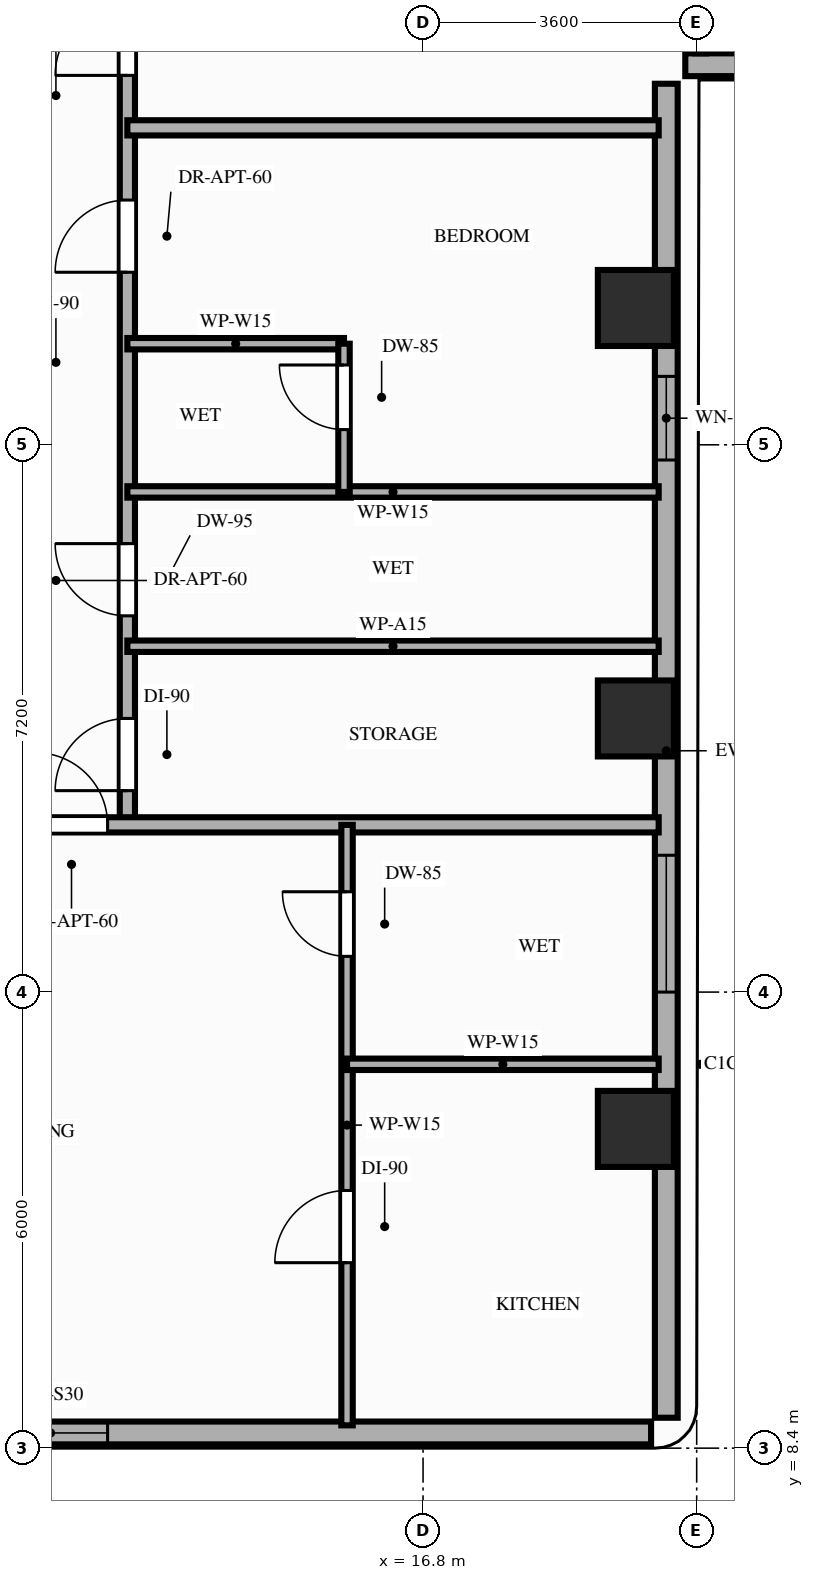
"""IFC4 building model, lengths in metres.
Left out: names, types, materials, properties, quantities, classifications, styles, units other than length and angle.
Written with IfcOpenShell. Run it as: python <this file> out.ifc"""

import sys

from ifc_helpers import new_model, si_unit, direction, frame, frame_2d, origin, origin_2d, place, context, subcontext, project, spatial, rectangle, extrude, element, fill, save


model = new_model("IFC4")
c1 = context("Model", 3, precision=1e-05, world=origin(), true_north=direction((0.0, 1.0)))
c2 = subcontext(c1, "Body", "Model", "MODEL_VIEW")
j1 = project(units=[si_unit("LENGTHUNIT", "METRE"), si_unit("PLANEANGLEUNIT", "RADIAN")], contexts=[c1])
p1 = place(None, origin())
s1 = spatial("IfcSite", under=j1, at=p1, CompositionType="ELEMENT")
p2 = place(p1, origin())
s2 = spatial("IfcBuilding", under=s1, at=p2, CompositionType="ELEMENT")
p3 = place(p2, frame((0.0, 0.0, 120.2)))
s3 = spatial("IfcBuildingStorey", under=s2, at=p3, CompositionType="ELEMENT", Elevation=120.2)
for number, where, z_axis, x_axis in (
    (1, (19.6, 12.6, 0.0), (0.0, 0.0, 1.0), (1.0, 0.0, 0.0)),
    (2, (19.6, 18.0, 0.0), (0.0, 0.0, 1.0), (1.0, 0.0, 0.0)),
    (3, (19.6, 23.4, 0.0), (0.0, 0.0, 1.0), (1.0, 0.0, 0.0)),
):
    element("IfcColumn", number, at=place(p3, frame(where, z_axis=z_axis, x_axis=x_axis)), inside=s3, PredefinedType="COLUMN", context=c2, shape_type="SweptSolid", body=[
        extrude(rectangle(XDim=1.0, YDim=1.0, at=origin_2d()), origin(), (0.0, 0.0, 1.0), 3.2),
    ])
p4 = place(p3, frame((4.0, 8.6, 0.0), z_axis=(0.0, 0.0, 1.0), x_axis=(1.0, 0.0, 0.0)))
e4 = element("IfcWall", 4, at=p4, inside=s3, PredefinedType="STANDARD", context=c2, shape_type="SweptSolid", body=[
    extrude(rectangle(XDim=15.8, YDim=0.3, at=frame_2d((7.9, 0.0))), origin(), (0.0, 0.0, 1.0), 3.02),
])
p5 = place(p4, frame((6.85, 0.0, 0.85)))
e5 = element("IfcOpeningElement", 5, at=p5, cuts=e4, PredefinedType="OPENING", context=c2, shape_type="SweptSolid", body=[
    extrude(rectangle(XDim=1.8, YDim=1.75, at=frame_2d((0.9, 0.875))), frame((0.0, 0.16, 0.0), z_axis=(0.0, -1.0, 0.0), x_axis=(1.0, 0.0, 0.0)), (0.0, 0.0, 1.0), 0.32),
])
p6 = place(p3, frame((20.0, 8.8, 0.0), z_axis=(0.0, 0.0, 1.0), x_axis=(0.0, 1.0, 0.0)))
e6 = element("IfcWall", 6, at=p6, inside=s3, PredefinedType="STANDARD", context=c2, shape_type="SweptSolid", body=[
    extrude(rectangle(XDim=17.55, YDim=0.3, at=frame_2d((8.775, 0.0))), origin(), (0.0, 0.0, 1.0), 2.41),
])
p7 = place(p6, frame((12.6, 0.0, 0.85)))
e7 = element("IfcOpeningElement", 7, at=p7, cuts=e6, PredefinedType="OPENING", context=c2, shape_type="SweptSolid", body=[
    extrude(rectangle(XDim=1.1, YDim=1.31, at=frame_2d((0.55, 0.655))), frame((0.0, 0.16, 0.0), z_axis=(0.0, -1.0, 0.0), x_axis=(1.0, 0.0, 0.0)), (0.0, 0.0, 1.0), 0.32),
])
p8 = place(p6, frame((5.6, 0.0, 0.85)))
e8 = element("IfcOpeningElement", 8, at=p8, cuts=e6, PredefinedType="OPENING", context=c2, shape_type="SweptSolid", body=[
    extrude(rectangle(XDim=1.8, YDim=1.31, at=frame_2d((0.9, 0.655))), frame((0.0, 0.16, 0.0), z_axis=(0.0, -1.0, 0.0), x_axis=(1.0, 0.0, 0.0)), (0.0, 0.0, 1.0), 0.32),
])
p9 = place(p3, frame((20.25, 26.6, 0.0), z_axis=(0.0, 0.0, 1.0), x_axis=(1.0, 0.0, 0.0)))
e9 = element("IfcWall", 9, at=p9, inside=s3, PredefinedType="STANDARD", context=c2, shape_type="SweptSolid", body=[
    extrude(rectangle(XDim=26.15, YDim=0.3, at=frame_2d((13.075, 0.0))), origin(), (0.0, 0.0, 1.0), 2.71),
])
p10 = place(p9, frame((13.85, 0.0, 0.0)))
e10 = element("IfcOpeningElement", 10, at=p10, cuts=e9, PredefinedType="OPENING", context=c2, shape_type="SweptSolid", body=[
    extrude(rectangle(XDim=1.4, YDim=2.1, at=frame_2d((0.7, 1.05))), frame((0.0, 0.16, 0.0), z_axis=(0.0, -1.0, 0.0), x_axis=(1.0, 0.0, 0.0)), (0.0, 0.0, 1.0), 0.32),
])
p11 = place(p9, frame((2.25, 0.0, 0.85)))
e11 = element("IfcOpeningElement", 11, at=p11, cuts=e9, PredefinedType="OPENING", context=c2, shape_type="SweptSolid", body=[
    extrude(rectangle(XDim=1.8, YDim=1.61, at=frame_2d((0.9, 0.805))), frame((0.0, 0.16, 0.0), z_axis=(0.0, -1.0, 0.0), x_axis=(1.0, 0.0, 0.0)), (0.0, 0.0, 1.0), 0.32),
])
p12 = place(p9, frame((22.25, 0.0, 0.85)))
e12 = element("IfcOpeningElement", 12, at=p12, cuts=e9, PredefinedType="OPENING", context=c2, shape_type="SweptSolid", body=[
    extrude(rectangle(XDim=1.8, YDim=1.61, at=frame_2d((0.9, 0.805))), frame((0.0, 0.16, 0.0), z_axis=(0.0, -1.0, 0.0), x_axis=(1.0, 0.0, 0.0)), (0.0, 0.0, 1.0), 0.32),
])
p13 = place(p3, frame((12.91, 16.6, 0.0), z_axis=(0.0, 0.0, 1.0), x_axis=(0.0, 1.0, 0.0)))
e13 = element("IfcWall", 13, at=p13, inside=s3, PredefinedType="PARTITIONING", context=c2, shape_type="SweptSolid", body=[
    extrude(rectangle(XDim=11.5, YDim=0.2, at=frame_2d((5.75, 0.0))), origin(), (0.0, 0.0, 1.0), 2.41),
])
p14 = place(p13, frame((0.45, 0.0, 0.0)))
e14 = element("IfcOpeningElement", 14, at=p14, cuts=e13, PredefinedType="OPENING", context=c2, shape_type="SweptSolid", body=[
    extrude(rectangle(XDim=0.95, YDim=2.15, at=frame_2d((0.475, 1.075))), frame((0.0, 0.11, 0.0), z_axis=(0.0, -1.0, 0.0), x_axis=(1.0, 0.0, 0.0)), (0.0, 0.0, 1.0), 0.22),
])
p15 = place(p13, frame((2.75, 0.0, 0.0)))
e15 = element("IfcOpeningElement", 15, at=p15, cuts=e13, PredefinedType="OPENING", context=c2, shape_type="SweptSolid", body=[
    extrude(rectangle(XDim=0.95, YDim=2.1, at=frame_2d((0.475, 1.05))), frame((0.0, 0.11, 0.0), z_axis=(0.0, -1.0, 0.0), x_axis=(1.0, 0.0, 0.0)), (0.0, 0.0, 1.0), 0.22),
])
p16 = place(p13, frame((9.86, 0.0, 0.0)))
e16 = element("IfcOpeningElement", 16, at=p16, cuts=e13, PredefinedType="OPENING", context=c2, shape_type="SweptSolid", body=[
    extrude(rectangle(XDim=0.95, YDim=2.15, at=frame_2d((0.475, 1.075))), frame((0.0, 0.11, 0.0), z_axis=(0.0, -1.0, 0.0), x_axis=(1.0, 0.0, 0.0)), (0.0, 0.0, 1.0), 0.22),
])
p17 = place(p13, frame((7.27, 0.0, 0.0)))
e17 = element("IfcOpeningElement", 17, at=p17, cuts=e13, PredefinedType="OPENING", context=c2, shape_type="SweptSolid", body=[
    extrude(rectangle(XDim=0.95, YDim=2.15, at=frame_2d((0.475, 1.075))), frame((0.0, 0.11, 0.0), z_axis=(0.0, -1.0, 0.0), x_axis=(1.0, 0.0, 0.0)), (0.0, 0.0, 1.0), 0.22),
])
p18 = place(p3, frame((3.9, 16.6, 0.0), z_axis=(0.0, 0.0, 1.0), x_axis=(1.0, 0.0, 0.0)))
e18 = element("IfcWall", 18, at=p18, inside=s3, PredefinedType="PARTITIONING", context=c2, shape_type="SweptSolid", body=[
    extrude(rectangle(XDim=16.0, YDim=0.2, at=frame_2d((8.0, 0.0))), origin(), (0.0, 0.0, 1.0), 2.41),
])
p19 = place(p18, frame((7.8, 0.0, 0.0)))
e19 = element("IfcOpeningElement", 19, at=p19, cuts=e18, PredefinedType="OPENING", context=c2, shape_type="SweptSolid", body=[
    extrude(rectangle(XDim=0.95, YDim=2.15, at=frame_2d((0.475, 1.075))), frame((0.0, 0.11, 0.0), z_axis=(0.0, -1.0, 0.0), x_axis=(1.0, 0.0, 0.0)), (0.0, 0.0, 1.0), 0.22),
])
p20 = place(p3, frame((20.45, 26.75, 0.0), z_axis=(0.0, 0.0, 1.0), x_axis=(0.0, 1.0, 0.0)))
e20 = element("IfcWall", 20, at=p20, inside=s3, PredefinedType="PARTITIONING", context=c2, shape_type="SweptSolid", body=[
    extrude(rectangle(XDim=2.95, YDim=0.15, at=frame_2d((1.475, 0.0))), origin(), (0.0, 0.0, 1.0), 2.41),
])
p21 = place(p3, frame((15.8, 8.7, 0.0), z_axis=(0.0, 0.0, 1.0), x_axis=(0.0, 1.0, 0.0)))
e21 = element("IfcWall", 21, at=p21, inside=s3, PredefinedType="PARTITIONING", context=c2, shape_type="SweptSolid", body=[
    extrude(rectangle(XDim=7.9, YDim=0.15, at=frame_2d((3.95, 0.0))), origin(), (0.0, 0.0, 1.0), 2.41),
])
p22 = place(p21, frame((2.14, 0.0, 0.0)))
e22 = element("IfcOpeningElement", 22, at=p22, cuts=e21, PredefinedType="OPENING", context=c2, shape_type="SweptSolid", body=[
    extrude(rectangle(XDim=0.95, YDim=2.15, at=frame_2d((0.475, 1.075))), frame((0.0, 0.085, 0.0), z_axis=(0.0, -1.0, 0.0), x_axis=(1.0, 0.0, 0.0)), (0.0, 0.0, 1.0), 0.17),
])
p23 = place(p21, frame((6.17, 0.0, 0.0)))
e23 = element("IfcOpeningElement", 23, at=p23, cuts=e21, PredefinedType="OPENING", context=c2, shape_type="SweptSolid", body=[
    extrude(rectangle(XDim=0.85, YDim=2.1, at=frame_2d((0.425, 1.05))), frame((0.0, 0.085, 0.0), z_axis=(0.0, -1.0, 0.0), x_axis=(1.0, 0.0, 0.0)), (0.0, 0.0, 1.0), 0.17),
])
p24 = place(p3, frame((15.8, 13.45, 0.0), z_axis=(0.0, 0.0, 1.0), x_axis=(1.0, 0.0, 0.0)))
e24 = element("IfcWall", 24, at=p24, inside=s3, PredefinedType="PARTITIONING", context=c2, shape_type="SweptSolid", body=[
    extrude(rectangle(XDim=4.1, YDim=0.15, at=frame_2d((2.05, 0.0))), origin(), (0.0, 0.0, 1.0), 2.41),
])
for number, where, z_axis, x_axis in (
    (25, (12.91, 18.95, 0.0), (0.0, 0.0, 1.0), (1.0, 0.0, 0.0)),
    (26, (12.91, 20.98, 0.0), (0.0, 0.0, 1.0), (1.0, 0.0, 0.0)),
):
    element("IfcWall", number, at=place(p3, frame(where, z_axis=z_axis, x_axis=x_axis)), inside=s3, PredefinedType="PARTITIONING", context=c2, shape_type="SweptSolid", body=[
        extrude(rectangle(XDim=6.99, YDim=0.15, at=frame_2d((3.495, 0.0))), origin(), (0.0, 0.0, 1.0), 2.41),
    ])
p25 = place(p3, frame((12.91, 25.77, 0.0), z_axis=(0.0, 0.0, 1.0), x_axis=(1.0, 0.0, 0.0)))
e27 = element("IfcWall", 27, at=p25, inside=s3, PredefinedType="PARTITIONING", context=c2, shape_type="SweptSolid", body=[
    extrude(rectangle(XDim=6.99, YDim=0.2, at=frame_2d((3.495, 0.0))), origin(), (0.0, 0.0, 1.0), 2.41),
])
p26 = place(p3, frame((12.91, 22.93, 0.0), z_axis=(0.0, 0.0, 1.0), x_axis=(1.0, 0.0, 0.0)))
e28 = element("IfcWall", 28, at=p26, inside=s3, PredefinedType="PARTITIONING", context=c2, shape_type="SweptSolid", body=[
    extrude(rectangle(XDim=2.85, YDim=0.15, at=frame_2d((1.425, 0.0))), origin(), (0.0, 0.0, 1.0), 3.02),
])
p27 = place(p3, frame((15.76, 20.98, 0.0), z_axis=(0.0, 0.0, 1.0), x_axis=(0.0, 1.0, 0.0)))
e29 = element("IfcWall", 29, at=p27, inside=s3, PredefinedType="PARTITIONING", context=c2, shape_type="SweptSolid", body=[
    extrude(rectangle(XDim=1.95, YDim=0.15, at=frame_2d((0.975, 0.0))), origin(), (0.0, 0.0, 1.0), 2.6),
])
p28 = place(p27, frame((0.82, 0.0, 0.0)))
e30 = element("IfcOpeningElement", 30, at=p28, cuts=e29, PredefinedType="OPENING", context=c2, shape_type="SweptSolid", body=[
    extrude(rectangle(XDim=0.85, YDim=2.1, at=frame_2d((0.425, 1.05))), frame((0.0, 0.085, 0.0), z_axis=(0.0, -1.0, 0.0), x_axis=(1.0, 0.0, 0.0)), (0.0, 0.0, 1.0), 0.17),
])
p29 = place(p5, origin())
e31 = element("IfcWindow", 31, at=p29, inside=s3, PartitioningType="SINGLE_PANEL", PredefinedType="WINDOW", context=c2, shape_type="SweptSolid", body=[
    extrude(rectangle(XDim=1.8, YDim=1.75, at=frame_2d((0.9, 0.875))), frame((0.0, 0.03, 0.0), z_axis=(0.0, -1.0, 0.0), x_axis=(1.0, 0.0, 0.0)), (0.0, 0.0, 1.0), 0.06),
])
fill(e5, e31)
p30 = place(p7, origin())
e32 = element("IfcWindow", 32, at=p30, inside=s3, PartitioningType="SINGLE_PANEL", PredefinedType="WINDOW", context=c2, shape_type="SweptSolid", body=[
    extrude(rectangle(XDim=1.1, YDim=1.31, at=frame_2d((0.55, 0.655))), frame((0.0, 0.03, 0.0), z_axis=(0.0, -1.0, 0.0), x_axis=(1.0, 0.0, 0.0)), (0.0, 0.0, 1.0), 0.06),
])
fill(e7, e32)
p31 = place(p8, origin())
e33 = element("IfcWindow", 33, at=p31, inside=s3, PartitioningType="SINGLE_PANEL", PredefinedType="WINDOW", context=c2, shape_type="SweptSolid", body=[
    extrude(rectangle(XDim=1.8, YDim=1.31, at=frame_2d((0.9, 0.655))), frame((0.0, 0.03, 0.0), z_axis=(0.0, -1.0, 0.0), x_axis=(1.0, 0.0, 0.0)), (0.0, 0.0, 1.0), 0.06),
])
fill(e8, e33)
p32 = place(p19, origin())
e34 = element("IfcDoor", 34, at=p32, inside=s3, OperationType="SINGLE_SWING_LEFT", PredefinedType="DOOR", context=c2, shape_type="SweptSolid", body=[
    extrude(rectangle(XDim=0.95, YDim=2.15, at=frame_2d((0.475, 1.075))), frame((0.0, 0.025, 0.0), z_axis=(0.0, -1.0, 0.0), x_axis=(1.0, 0.0, 0.0)), (0.0, 0.0, 1.0), 0.05),
])
fill(e19, e34)
p33 = place(p22, origin())
e35 = element("IfcDoor", 35, at=p33, inside=s3, OperationType="SINGLE_SWING_LEFT", PredefinedType="DOOR", context=c2, shape_type="SweptSolid", body=[
    extrude(rectangle(XDim=0.95, YDim=2.15, at=frame_2d((0.475, 1.075))), frame((0.0, 0.025, 0.0), z_axis=(0.0, -1.0, 0.0), x_axis=(1.0, 0.0, 0.0)), (0.0, 0.0, 1.0), 0.05),
])
fill(e22, e35)
p34 = place(p23, origin())
e36 = element("IfcDoor", 36, at=p34, inside=s3, OperationType="SINGLE_SWING_RIGHT", PredefinedType="DOOR", context=c2, shape_type="SweptSolid", body=[
    extrude(rectangle(XDim=0.85, YDim=2.1, at=frame_2d((0.425, 1.05))), frame((0.0, 0.025, 0.0), z_axis=(0.0, -1.0, 0.0), x_axis=(1.0, 0.0, 0.0)), (0.0, 0.0, 1.0), 0.05),
])
fill(e23, e36)
p35 = place(p14, origin())
e37 = element("IfcDoor", 37, at=p35, inside=s3, OperationType="SINGLE_SWING_LEFT", PredefinedType="DOOR", context=c2, shape_type="SweptSolid", body=[
    extrude(rectangle(XDim=0.95, YDim=2.15, at=frame_2d((0.475, 1.075))), frame((0.0, 0.025, 0.0), z_axis=(0.0, -1.0, 0.0), x_axis=(1.0, 0.0, 0.0)), (0.0, 0.0, 1.0), 0.05),
])
fill(e14, e37)
p36 = place(p15, origin())
e38 = element("IfcDoor", 38, at=p36, inside=s3, OperationType="SINGLE_SWING_RIGHT", PredefinedType="DOOR", context=c2, shape_type="SweptSolid", body=[
    extrude(rectangle(XDim=0.95, YDim=2.1, at=frame_2d((0.475, 1.05))), frame((0.0, 0.025, 0.0), z_axis=(0.0, -1.0, 0.0), x_axis=(1.0, 0.0, 0.0)), (0.0, 0.0, 1.0), 0.05),
])
fill(e15, e38)
p37 = place(p16, origin())
e39 = element("IfcDoor", 39, at=p37, inside=s3, OperationType="SINGLE_SWING_LEFT", PredefinedType="DOOR", context=c2, shape_type="SweptSolid", body=[
    extrude(rectangle(XDim=0.95, YDim=2.15, at=frame_2d((0.475, 1.075))), frame((0.0, 0.025, 0.0), z_axis=(0.0, -1.0, 0.0), x_axis=(1.0, 0.0, 0.0)), (0.0, 0.0, 1.0), 0.05),
])
fill(e16, e39)
p38 = place(p28, origin())
e40 = element("IfcDoor", 40, at=p38, inside=s3, OperationType="SINGLE_SWING_RIGHT", PredefinedType="DOOR", context=c2, shape_type="SweptSolid", body=[
    extrude(rectangle(XDim=0.85, YDim=2.1, at=frame_2d((0.425, 1.05))), frame((0.0, 0.025, 0.0), z_axis=(0.0, -1.0, 0.0), x_axis=(1.0, 0.0, 0.0)), (0.0, 0.0, 1.0), 0.05),
])
fill(e30, e40)
p39 = place(p17, origin())
e41 = element("IfcDoor", 41, at=p39, inside=s3, OperationType="SINGLE_SWING_LEFT", PredefinedType="DOOR", context=c2, shape_type="SweptSolid", body=[
    extrude(rectangle(XDim=0.95, YDim=2.15, at=frame_2d((0.475, 1.075))), frame((0.0, 0.025, 0.0), z_axis=(0.0, -1.0, 0.0), x_axis=(1.0, 0.0, 0.0)), (0.0, 0.0, 1.0), 0.05),
])
fill(e17, e41)
save(model, sys.argv[1])
